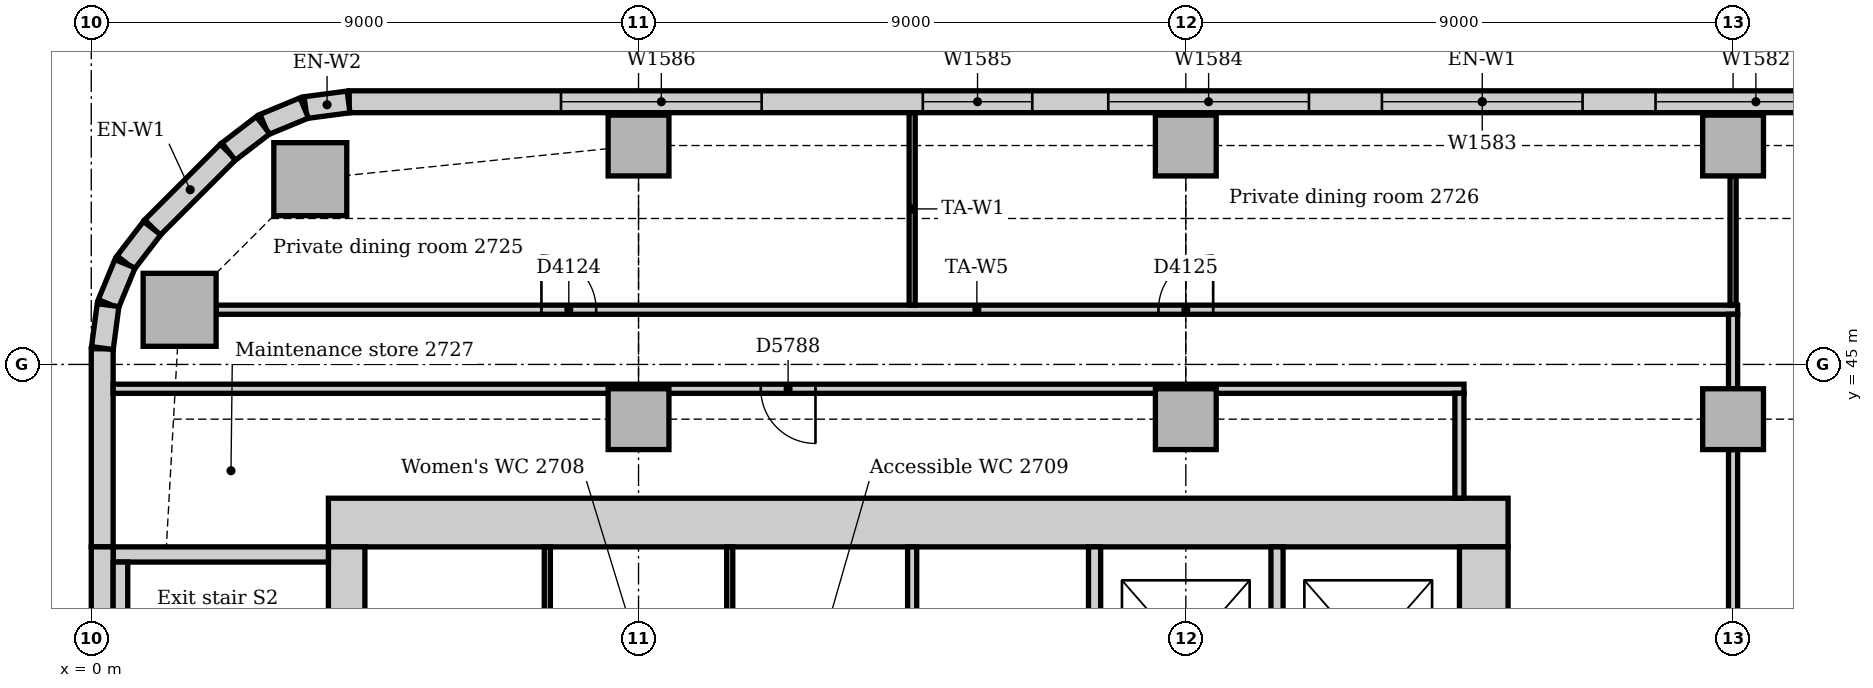
"""IFC4 building model, lengths in metres.
Left out: names, types, materials, properties, quantities, classifications, styles, units other than length and angle.
Written with IfcOpenShell. Run it as: python <this file> out.ifc"""

import sys

from ifc_helpers import new_model, si_unit, direction, frame, frame_2d, origin, origin_2d, place, context, subcontext, project, spatial, rectangle, extrude, element, fill, save


model = new_model("IFC4")
c1 = context("Model", 3, precision=1e-05, world=origin(), true_north=direction((0.0, 1.0)))
c2 = subcontext(c1, "Body", "Model", "MODEL_VIEW")
j1 = project(units=[si_unit("LENGTHUNIT", "METRE"), si_unit("PLANEANGLEUNIT", "RADIAN")], contexts=[c1])
p1 = place(None, origin())
s1 = spatial("IfcSite", under=j1, at=p1, CompositionType="ELEMENT")
p2 = place(p1, origin())
s2 = spatial("IfcBuilding", under=s1, at=p2, CompositionType="ELEMENT")
p3 = place(p2, frame((0.0, 0.0, 116.0)))
s3 = spatial("IfcBuildingStorey", under=s2, at=p3, CompositionType="ELEMENT", Elevation=116.0)
p4 = place(p3, frame((23.3, 42.4, 0.0), z_axis=(0.0, 0.0, 1.0), x_axis=(-1.0, 0.0, 0.0)))
e1 = element("IfcWall", 1, at=p4, inside=s3, PredefinedType="SOLIDWALL", context=c2, shape_type="SweptSolid", body=[
    extrude(rectangle(XDim=19.4, YDim=0.8, at=frame_2d((9.7, 0.0))), origin(), (0.0, 0.0, 1.0), 4.0),
])
p5 = place(p3, frame((22.9, 31.5, 0.0), z_axis=(0.0, 0.0, 1.0), x_axis=(0.0, 1.0, 0.0)))
e2 = element("IfcWall", 2, at=p5, inside=s3, PredefinedType="SOLIDWALL", context=c2, shape_type="SweptSolid", body=[
    extrude(rectangle(XDim=10.5, YDim=0.8, at=frame_2d((5.25, 0.0))), origin(), (0.0, 0.0, 1.0), 4.0),
])
p6 = place(p5, frame((3.15, 0.0, 0.0)))
e3 = element("IfcOpeningElement", 3, at=p6, cuts=e2, PredefinedType="OPENING", context=c2, shape_type="SweptSolid", body=[
    extrude(rectangle(XDim=1.0, YDim=2.1, at=frame_2d((0.5, 1.05))), frame((0.0, 0.41, 0.0), z_axis=(0.0, -1.0, 0.0), x_axis=(1.0, 0.0, 0.0)), (0.0, 0.0, 1.0), 0.82),
])
p7 = place(p5, frame((5.2, 0.0, 0.0)))
e4 = element("IfcOpeningElement", 4, at=p7, cuts=e2, PredefinedType="OPENING", context=c2, shape_type="SweptSolid", body=[
    extrude(rectangle(XDim=1.0, YDim=2.1, at=frame_2d((0.5, 1.05))), frame((0.0, 0.41, 0.0), z_axis=(0.0, -1.0, 0.0), x_axis=(1.0, 0.0, 0.0)), (0.0, 0.0, 1.0), 0.82),
])
p8 = place(p3, frame((4.2, 42.0, 0.0), z_axis=(0.0, 0.0, 1.0), x_axis=(0.0, -1.0, 0.0)))
e5 = element("IfcWall", 5, at=p8, inside=s3, PredefinedType="SOLIDWALL", context=c2, shape_type="SweptSolid", body=[
    extrude(rectangle(XDim=10.5, YDim=0.6, at=frame_2d((5.25, 0.0))), origin(), (0.0, 0.0, 1.0), 4.0),
])
p9 = place(p8, frame((5.3, 0.0, 0.0)))
e6 = element("IfcOpeningElement", 6, at=p9, cuts=e5, PredefinedType="OPENING", context=c2, shape_type="SweptSolid", body=[
    extrude(rectangle(XDim=1.0, YDim=2.1, at=frame_2d((0.5, 1.05))), frame((0.0, 0.31, 0.0), z_axis=(0.0, -1.0, 0.0), x_axis=(1.0, 0.0, 0.0)), (0.0, 0.0, 1.0), 0.62),
])
p10 = place(p3, frame((3.9, 41.875, 0.0), z_axis=(0.0, 0.0, 1.0), x_axis=(-1.0, 0.0, 0.0)))
e7 = element("IfcWall", 7, at=p10, inside=s3, PredefinedType="SOLIDWALL", context=c2, shape_type="SweptSolid", body=[
    extrude(rectangle(XDim=3.54, YDim=0.25, at=frame_2d((1.77, 0.0))), origin(), (0.0, 0.0, 1.0), 4.0),
])
for number, where, z_axis, x_axis in (
    (8, (3.602, 48.047, 0.0), (0.0, 0.0, 1.0), (1.0, 0.0, 0.0)),
    (9, (1.453, 45.898, 0.0), (0.0, 0.0, 1.0), (1.0, 0.0, 0.0)),
):
    element("IfcColumn", number, at=place(p3, frame(where, z_axis=z_axis, x_axis=x_axis)), inside=s3, PredefinedType="COLUMN", context=c2, shape_type="SweptSolid", body=[
        extrude(rectangle(XDim=1.2, YDim=1.2, at=origin_2d()), origin(), (0.0, 0.0, 1.0), 3.85),
    ])
for number, where, z_axis, x_axis in (
    (10, (9.0, 48.6, 0.0), (0.0, 0.0, 1.0), (1.0, 0.0, 0.0)),
    (11, (18.0, 48.6, 0.0), (0.0, 0.0, 1.0), (1.0, 0.0, 0.0)),
    (12, (27.0, 48.6, 0.0), (0.0, 0.0, 1.0), (1.0, 0.0, 0.0)),
    (13, (9.0, 44.1, 0.0), (0.0, 0.0, 1.0), (1.0, 0.0, 0.0)),
    (14, (18.0, 44.1, 0.0), (0.0, 0.0, 1.0), (1.0, 0.0, 0.0)),
    (15, (27.0, 44.1, 0.0), (0.0, 0.0, 1.0), (1.0, 0.0, 0.0)),
):
    element("IfcColumn", number, at=place(p3, frame(where, z_axis=z_axis, x_axis=x_axis)), inside=s3, PredefinedType="COLUMN", context=c2, shape_type="SweptSolid", body=[
        extrude(rectangle(XDim=1.0, YDim=1.0, at=origin_2d()), origin(), (0.0, 0.0, 1.0), 3.85),
    ])
p11 = place(p3, frame((41.507, 49.32, 0.0), z_axis=(0.0, 0.0, 1.0), x_axis=(-1.0, 0.0, 0.0)))
e16 = element("IfcWall", 16, at=p11, inside=s3, PredefinedType="STANDARD", context=c2, shape_type="SweptSolid", body=[
    extrude(rectangle(XDim=37.265, YDim=0.36, at=frame_2d((18.632, 0.0))), origin(), (0.0, 0.0, 1.0), 3.85),
])
p12 = place(p11, frame((3.482, 0.0, 0.9)))
e17 = element("IfcOpeningElement", 17, at=p12, cuts=e16, PredefinedType="OPENING", context=c2, shape_type="SweptSolid", body=[
    extrude(rectangle(XDim=3.3, YDim=1.6, at=frame_2d((1.65, 0.8))), frame((0.0, 0.19, 0.0), z_axis=(0.0, -1.0, 0.0), x_axis=(1.0, 0.0, 0.0)), (0.0, 0.0, 1.0), 0.38),
])
p13 = place(p11, frame((7.982, 0.0, 0.9)))
e18 = element("IfcOpeningElement", 18, at=p13, cuts=e16, PredefinedType="OPENING", context=c2, shape_type="SweptSolid", body=[
    extrude(rectangle(XDim=3.3, YDim=1.6, at=frame_2d((1.65, 0.8))), frame((0.0, 0.19, 0.0), z_axis=(0.0, -1.0, 0.0), x_axis=(1.0, 0.0, 0.0)), (0.0, 0.0, 1.0), 0.38),
])
p14 = place(p11, frame((12.482, 0.0, 0.9)))
e19 = element("IfcOpeningElement", 19, at=p14, cuts=e16, PredefinedType="OPENING", context=c2, shape_type="SweptSolid", body=[
    extrude(rectangle(XDim=3.3, YDim=1.6, at=frame_2d((1.65, 0.8))), frame((0.0, 0.19, 0.0), z_axis=(0.0, -1.0, 0.0), x_axis=(1.0, 0.0, 0.0)), (0.0, 0.0, 1.0), 0.38),
])
p15 = place(p11, frame((16.982, 0.0, 0.9)))
e20 = element("IfcOpeningElement", 20, at=p15, cuts=e16, PredefinedType="OPENING", context=c2, shape_type="SweptSolid", body=[
    extrude(rectangle(XDim=3.3, YDim=1.6, at=frame_2d((1.65, 0.8))), frame((0.0, 0.19, 0.0), z_axis=(0.0, -1.0, 0.0), x_axis=(1.0, 0.0, 0.0)), (0.0, 0.0, 1.0), 0.38),
])
p16 = place(p11, frame((21.482, 0.0, 0.9)))
e21 = element("IfcOpeningElement", 21, at=p16, cuts=e16, PredefinedType="OPENING", context=c2, shape_type="SweptSolid", body=[
    extrude(rectangle(XDim=3.3, YDim=1.6, at=frame_2d((1.65, 0.8))), frame((0.0, 0.19, 0.0), z_axis=(0.0, -1.0, 0.0), x_axis=(1.0, 0.0, 0.0)), (0.0, 0.0, 1.0), 0.38),
])
p17 = place(p11, frame((26.032, 0.0, 0.9)))
e22 = element("IfcOpeningElement", 22, at=p17, cuts=e16, PredefinedType="OPENING", context=c2, shape_type="SweptSolid", body=[
    extrude(rectangle(XDim=1.8, YDim=1.6, at=frame_2d((0.9, 0.8))), frame((0.0, 0.19, 0.0), z_axis=(0.0, -1.0, 0.0), x_axis=(1.0, 0.0, 0.0)), (0.0, 0.0, 1.0), 0.38),
])
p18 = place(p11, frame((30.482, 0.0, 0.9)))
e23 = element("IfcOpeningElement", 23, at=p18, cuts=e16, PredefinedType="OPENING", context=c2, shape_type="SweptSolid", body=[
    extrude(rectangle(XDim=3.3, YDim=1.6, at=frame_2d((1.65, 0.8))), frame((0.0, 0.19, 0.0), z_axis=(0.0, -1.0, 0.0), x_axis=(1.0, 0.0, 0.0)), (0.0, 0.0, 1.0), 0.38),
])
p19 = place(p3, frame((2.249, 48.494, 0.0), z_axis=(0.0, 0.0, 1.0), x_axis=(-0.707106781187, -0.707106781187, 0.0)))
e24 = element("IfcWall", 24, at=p19, inside=s3, PredefinedType="STANDARD", context=c2, shape_type="SweptSolid", body=[
    extrude(rectangle(XDim=1.757, YDim=0.36, at=frame_2d((0.879, 0.0))), origin(), (0.0, 0.0, 1.0), 3.85),
])
p20 = place(p3, frame((0.18, 45.257, 0.0), z_axis=(0.0, 0.0, 1.0), x_axis=(0.0, -1.0, 0.0)))
e25 = element("IfcWall", 25, at=p20, inside=s3, PredefinedType="STANDARD", context=c2, shape_type="SweptSolid", body=[
    extrude(rectangle(XDim=3.257, YDim=0.36, at=frame_2d((1.629, 0.0))), origin(), (0.0, 0.0, 1.0), 3.85),
])
p21 = place(p3, frame((0.18, 42.0, 0.0), z_axis=(0.0, 0.0, 1.0), x_axis=(0.0, -1.0, 0.0)))
e26 = element("IfcWall", 26, at=p21, inside=s3, PredefinedType="STANDARD", context=c2, shape_type="SweptSolid", body=[
    extrude(rectangle(XDim=6.75, YDim=0.36, at=frame_2d((3.375, 0.0))), origin(), (0.0, 0.0, 1.0), 3.85),
])
for number, where, z_axis, x_axis in (
    (27, (4.231, 49.317, 0.0), (0.0, 0.0, 1.0), (-0.991, -0.131, 0.0)),
    (28, (3.503, 49.218, 0.0), (0.0, 0.0, 1.0), (-0.924, -0.383, 0.0)),
):
    element("IfcWall", number, at=place(p3, frame(where, z_axis=z_axis, x_axis=x_axis)), inside=s3, PredefinedType="STANDARD", context=c2, shape_type="SweptSolid", body=[
        extrude(rectangle(XDim=0.713, YDim=0.36, at=frame_2d((0.356, 0.0))), origin(), (0.0, 0.0, 1.0), 3.85),
    ])
for number, where, z_axis, x_axis in (
    (29, (2.825, 48.934, 0.0), (0.0, 0.0, 1.0), (-0.793, -0.609, 0.0)),
    (30, (1.0, 47.241, 0.0), (0.0, 0.0, 1.0), (-0.609, -0.793, 0.0)),
):
    element("IfcWall", number, at=place(p3, frame(where, z_axis=z_axis, x_axis=x_axis)), inside=s3, PredefinedType="STANDARD", context=c2, shape_type="SweptSolid", body=[
        extrude(rectangle(XDim=0.713, YDim=0.36, at=frame_2d((0.357, 0.0))), origin(), (0.0, 0.0, 1.0), 3.85),
    ])
for number, where, z_axis, x_axis in (
    (31, (0.555, 46.656, 0.0), (0.0, 0.0, 1.0), (-0.383, -0.924, 0.0)),
    (32, (0.276, 45.976, 0.0), (0.0, 0.0, 1.0), (-0.131, -0.991, 0.0)),
):
    element("IfcWall", number, at=place(p3, frame(where, z_axis=z_axis, x_axis=x_axis)), inside=s3, PredefinedType="STANDARD", context=c2, shape_type="SweptSolid", body=[
        extrude(rectangle(XDim=0.713, YDim=0.36, at=frame_2d((0.356, 0.0))), origin(), (0.0, 0.0, 1.0), 3.85),
    ])
p22 = place(p3, frame((0.48, 40.13, 0.0), z_axis=(0.0, 0.0, 1.0), x_axis=(0.0, 1.0, 0.0)))
e33 = element("IfcWall", 33, at=p22, inside=s3, PredefinedType="STANDARD", context=c2, shape_type="SweptSolid", body=[
    extrude(rectangle(XDim=1.62, YDim=0.24, at=frame_2d((0.81, 0.0))), origin(), (0.0, 0.0, 1.0), 4.0),
])
for number, where, z_axis, x_axis in (
    (34, (16.5, 38.6, 0.0), (0.0, 0.0, 1.0), (0.0, 1.0, 0.0)),
    (35, (19.5, 38.6, 0.0), (0.0, 0.0, 1.0), (0.0, 1.0, 0.0)),
):
    element("IfcWall", number, at=place(p3, frame(where, z_axis=z_axis, x_axis=x_axis)), inside=s3, PredefinedType="PARTITIONING", context=c2, shape_type="SweptSolid", body=[
        extrude(rectangle(XDim=3.4, YDim=0.2, at=frame_2d((1.7, 0.0))), origin(), (0.0, 0.0, 1.0), 3.85),
    ])
p23 = place(p3, frame((2.053, 45.9, 0.0), z_axis=(0.0, 0.0, 1.0), x_axis=(1.0, 0.0, 0.0)))
e36 = element("IfcWall", 36, at=p23, inside=s3, PredefinedType="PARTITIONING", context=c2, shape_type="SweptSolid", body=[
    extrude(rectangle(XDim=25.022, YDim=0.15, at=frame_2d((12.511, 0.0))), origin(), (0.0, 0.0, 1.0), 3.85),
])
p24 = place(p23, frame((5.35, 0.0, 0.0)))
e37 = element("IfcOpeningElement", 37, at=p24, cuts=e36, PredefinedType="OPENING", context=c2, shape_type="SweptSolid", body=[
    extrude(rectangle(XDim=0.9, YDim=2.1, at=frame_2d((0.45, 1.05))), frame((0.0, 0.085, 0.0), z_axis=(0.0, -1.0, 0.0), x_axis=(1.0, 0.0, 0.0)), (0.0, 0.0, 1.0), 0.17),
])
p25 = place(p23, frame((15.497, 0.0, 0.0)))
e38 = element("IfcOpeningElement", 38, at=p25, cuts=e36, PredefinedType="OPENING", context=c2, shape_type="SweptSolid", body=[
    extrude(rectangle(XDim=0.9, YDim=2.1, at=frame_2d((0.45, 1.05))), frame((0.0, 0.085, 0.0), z_axis=(0.0, -1.0, 0.0), x_axis=(1.0, 0.0, 0.0)), (0.0, 0.0, 1.0), 0.17),
])
p26 = place(p3, frame((0.36, 44.6, 0.0), z_axis=(0.0, 0.0, 1.0), x_axis=(1.0, 0.0, 0.0)))
e39 = element("IfcWall", 39, at=p26, inside=s3, PredefinedType="PARTITIONING", context=c2, shape_type="SweptSolid", body=[
    extrude(rectangle(XDim=22.215, YDim=0.15, at=frame_2d((11.107, 0.0))), origin(), (0.0, 0.0, 1.0), 3.85),
])
p27 = place(p26, frame((10.65, 0.0, 0.0)))
e40 = element("IfcOpeningElement", 40, at=p27, cuts=e39, PredefinedType="OPENING", context=c2, shape_type="SweptSolid", body=[
    extrude(rectangle(XDim=0.9, YDim=2.1, at=frame_2d((0.45, 1.05))), frame((0.0, 0.085, 0.0), z_axis=(0.0, -1.0, 0.0), x_axis=(1.0, 0.0, 0.0)), (0.0, 0.0, 1.0), 0.17),
])
p28 = place(p3, frame((27.0, 36.5, 0.0), z_axis=(0.0, 0.0, 1.0), x_axis=(0.0, 1.0, 0.0)))
e41 = element("IfcWall", 41, at=p28, inside=s3, PredefinedType="PARTITIONING", context=c2, shape_type="SweptSolid", body=[
    extrude(rectangle(XDim=7.1, YDim=0.15, at=frame_2d((3.55, 0.0))), origin(), (0.0, 0.0, 1.0), 3.256),
])
p29 = place(p3, frame((27.0, 44.6, 0.0), z_axis=(0.0, 0.0, 1.0), x_axis=(0.0, 1.0, 0.0)))
e42 = element("IfcWall", 42, at=p29, inside=s3, PredefinedType="PARTITIONING", context=c2, shape_type="SweptSolid", body=[
    extrude(rectangle(XDim=1.225, YDim=0.15, at=frame_2d((0.613, 0.0))), origin(), (0.0, 0.0, 1.0), 3.652),
])
p30 = place(p3, frame((22.5, 42.8, 0.0), z_axis=(0.0, 0.0, 1.0), x_axis=(0.0, 1.0, 0.0)))
e43 = element("IfcWall", 43, at=p30, inside=s3, PredefinedType="PARTITIONING", context=c2, shape_type="SweptSolid", body=[
    extrude(rectangle(XDim=1.725, YDim=0.15, at=frame_2d((0.863, 0.0))), origin(), (0.0, 0.0, 1.0), 3.85),
])
p31 = place(p3, frame((13.5, 38.575, 0.0), z_axis=(0.0, 0.0, 1.0), x_axis=(0.0, 1.0, 0.0)))
e44 = element("IfcWall", 44, at=p31, inside=s3, PredefinedType="PARTITIONING", context=c2, shape_type="SweptSolid", body=[
    extrude(rectangle(XDim=3.425, YDim=0.15, at=frame_2d((1.712, 0.0))), origin(), (0.0, 0.0, 1.0), 3.85),
])
for number, where, z_axis, x_axis in (
    (45, (7.5, 38.575, 0.0), (0.0, 0.0, 1.0), (0.0, 1.0, 0.0)),
    (46, (10.5, 38.575, 0.0), (0.0, 0.0, 1.0), (0.0, 1.0, 0.0)),
):
    element("IfcWall", number, at=place(p3, frame(where, z_axis=z_axis, x_axis=x_axis)), inside=s3, PredefinedType="PARTITIONING", context=c2, shape_type="SweptSolid", body=[
        extrude(rectangle(XDim=3.425, YDim=0.1, at=frame_2d((1.712, 0.0))), origin(), (0.0, 0.0, 1.0), 3.85),
    ])
p32 = place(p3, frame((13.5, 45.975, 0.0), z_axis=(0.0, 0.0, 1.0), x_axis=(0.0, 1.0, 0.0)))
e47 = element("IfcWall", 47, at=p32, inside=s3, PredefinedType="PARTITIONING", context=c2, shape_type="SweptSolid", body=[
    extrude(rectangle(XDim=3.165, YDim=0.1, at=frame_2d((1.583, 0.0))), origin(), (0.0, 0.0, 1.0), 3.85),
])
p33 = place(p3, frame((27.0, 45.975, 0.0), z_axis=(0.0, 0.0, 1.0), x_axis=(0.0, 1.0, 0.0)))
e48 = element("IfcWall", 48, at=p33, inside=s3, PredefinedType="PARTITIONING", context=c2, shape_type="SweptSolid", body=[
    extrude(rectangle(XDim=2.125, YDim=0.1, at=frame_2d((1.062, 0.0))), origin(), (0.0, 0.0, 1.0), 3.652),
])
p34 = place(p14, origin())
e49 = element("IfcWindow", 49, at=p34, inside=s3, PartitioningType="SINGLE_PANEL", PredefinedType="WINDOW", context=c2, shape_type="SweptSolid", body=[
    extrude(rectangle(XDim=3.3, YDim=1.6, at=frame_2d((1.65, 0.8))), frame((0.0, 0.13, 0.0), z_axis=(0.0, -1.0, 0.0), x_axis=(1.0, 0.0, 0.0)), (0.0, 0.0, 1.0), 0.06),
])
fill(e19, e49)
p35 = place(p15, origin())
e50 = element("IfcWindow", 50, at=p35, inside=s3, PartitioningType="SINGLE_PANEL", PredefinedType="WINDOW", context=c2, shape_type="SweptSolid", body=[
    extrude(rectangle(XDim=3.3, YDim=1.6, at=frame_2d((1.65, 0.8))), frame((0.0, 0.13, 0.0), z_axis=(0.0, -1.0, 0.0), x_axis=(1.0, 0.0, 0.0)), (0.0, 0.0, 1.0), 0.06),
])
fill(e20, e50)
p36 = place(p16, origin())
e51 = element("IfcWindow", 51, at=p36, inside=s3, PartitioningType="SINGLE_PANEL", PredefinedType="WINDOW", context=c2, shape_type="SweptSolid", body=[
    extrude(rectangle(XDim=3.3, YDim=1.6, at=frame_2d((1.65, 0.8))), frame((0.0, 0.13, 0.0), z_axis=(0.0, -1.0, 0.0), x_axis=(1.0, 0.0, 0.0)), (0.0, 0.0, 1.0), 0.06),
])
fill(e21, e51)
p37 = place(p17, origin())
e52 = element("IfcWindow", 52, at=p37, inside=s3, PartitioningType="SINGLE_PANEL", PredefinedType="WINDOW", context=c2, shape_type="SweptSolid", body=[
    extrude(rectangle(XDim=1.8, YDim=1.6, at=frame_2d((0.9, 0.8))), frame((0.0, 0.13, 0.0), z_axis=(0.0, -1.0, 0.0), x_axis=(1.0, 0.0, 0.0)), (0.0, 0.0, 1.0), 0.06),
])
fill(e22, e52)
p38 = place(p18, origin())
e53 = element("IfcWindow", 53, at=p38, inside=s3, PartitioningType="SINGLE_PANEL", PredefinedType="WINDOW", context=c2, shape_type="SweptSolid", body=[
    extrude(rectangle(XDim=3.3, YDim=1.6, at=frame_2d((1.65, 0.8))), frame((0.0, 0.13, 0.0), z_axis=(0.0, -1.0, 0.0), x_axis=(1.0, 0.0, 0.0)), (0.0, 0.0, 1.0), 0.06),
])
fill(e23, e53)
p39 = place(p24, origin())
e54 = element("IfcDoor", 54, at=p39, inside=s3, OperationType="SINGLE_SWING_LEFT", PredefinedType="DOOR", context=c2, shape_type="SweptSolid", body=[
    extrude(rectangle(XDim=0.9, YDim=2.1, at=frame_2d((0.45, 1.05))), frame((0.0, 0.025, 0.0), z_axis=(0.0, -1.0, 0.0), x_axis=(1.0, 0.0, 0.0)), (0.0, 0.0, 1.0), 0.05),
])
fill(e37, e54)
p40 = place(p25, origin())
e55 = element("IfcDoor", 55, at=p40, inside=s3, OperationType="SINGLE_SWING_RIGHT", PredefinedType="DOOR", context=c2, shape_type="SweptSolid", body=[
    extrude(rectangle(XDim=0.9, YDim=2.1, at=frame_2d((0.45, 1.05))), frame((0.0, 0.025, 0.0), z_axis=(0.0, -1.0, 0.0), x_axis=(1.0, 0.0, 0.0)), (0.0, 0.0, 1.0), 0.05),
])
fill(e38, e55)
p41 = place(p27, frame((0.9, 0.0, 0.0), z_axis=(0.0, 0.0, 1.0), x_axis=(-1.0, 0.0, 0.0)))
e56 = element("IfcDoor", 56, at=p41, inside=s3, OperationType="SINGLE_SWING_LEFT", PredefinedType="DOOR", context=c2, shape_type="SweptSolid", body=[
    extrude(rectangle(XDim=0.9, YDim=2.1, at=frame_2d((0.45, 1.05))), frame((0.0, 0.025, 0.0), z_axis=(0.0, -1.0, 0.0), x_axis=(1.0, 0.0, 0.0)), (0.0, 0.0, 1.0), 0.05),
])
fill(e40, e56)
save(model, sys.argv[1])
